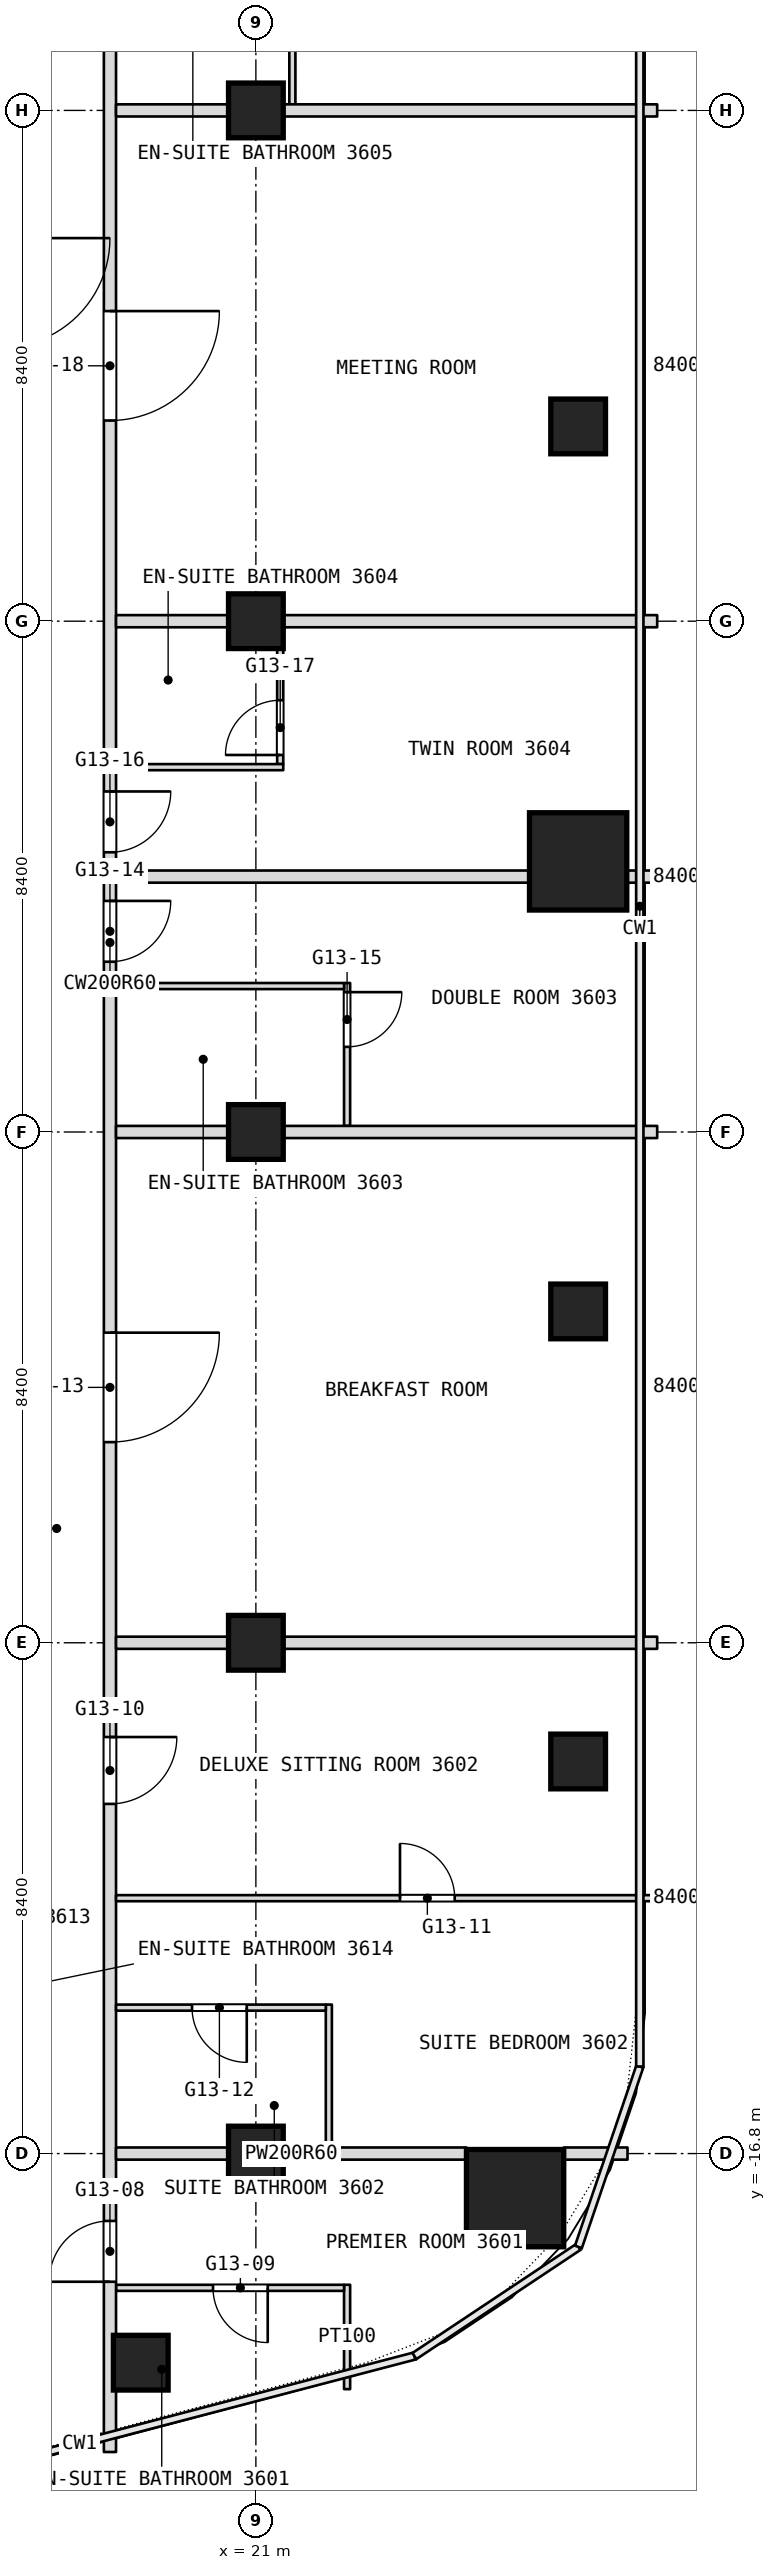
"""IFC4 building model, lengths in metres.
Left out: names, types, materials, properties, quantities, classifications, styles, units other than length and angle.
Written with IfcOpenShell. Run it as: python <this file> out.ifc"""

import sys

from ifc_helpers import new_model, si_unit, direction, frame, frame_2d, origin, origin_2d, place, context, subcontext, project, spatial, rectangle, extrude, element, fill, save


model = new_model("IFC4")
c1 = context("Model", 3, precision=1e-05, world=origin(), true_north=direction((0.0, 1.0)))
c2 = subcontext(c1, "Body", "Model", "MODEL_VIEW")
j1 = project(units=[si_unit("LENGTHUNIT", "METRE"), si_unit("PLANEANGLEUNIT", "RADIAN")], contexts=[c1])
p1 = place(None, origin())
s1 = spatial("IfcSite", under=j1, at=p1, CompositionType="ELEMENT")
p2 = place(p1, origin())
s2 = spatial("IfcBuilding", under=s1, at=p2, CompositionType="ELEMENT")
p3 = place(p2, frame((0.0, 0.0, 155.3)))
s3 = spatial("IfcBuildingStorey", under=s2, at=p3, CompositionType="ELEMENT", Elevation=155.3)
for number, where, z_axis, x_axis in (
    (1, (25.263, -17.533, 0.0), (0.0, 0.0, 1.0), (1.0, 0.0, 0.0)),
    (2, (26.3, 4.45, 0.0), (0.0, 0.0, 1.0), (1.0, 0.0, 0.0)),
):
    element("IfcColumn", number, at=place(p3, frame(where, z_axis=z_axis, x_axis=x_axis)), inside=s3, PredefinedType="COLUMN", context=c2, shape_type="SweptSolid", body=[
        extrude(rectangle(XDim=1.6, YDim=1.6, at=origin_2d()), origin(), (0.0, 0.0, 1.0), 3.6),
    ])
for number, where, z_axis, x_axis in (
    (3, (21.0, -16.8, 0.0), (0.0, 0.0, 1.0), (1.0, 0.0, 0.0)),
    (4, (21.0, -8.4, 0.0), (0.0, 0.0, 1.0), (1.0, 0.0, 0.0)),
    (5, (21.0, 0.0, 0.0), (0.0, 0.0, 1.0), (1.0, 0.0, 0.0)),
    (6, (21.0, 8.4, 0.0), (0.0, 0.0, 1.0), (1.0, 0.0, 0.0)),
    (7, (21.0, 16.8, 0.0), (0.0, 0.0, 1.0), (1.0, 0.0, 0.0)),
    (8, (26.3, 11.603, 0.0), (0.0, 0.0, 1.0), (1.0, 0.0, 0.0)),
    (9, (26.3, -2.951, 0.0), (0.0, 0.0, 1.0), (1.0, 0.0, 0.0)),
    (10, (26.3, -10.352, 0.0), (0.0, 0.0, 1.0), (1.0, 0.0, 0.0)),
    (11, (19.107, -20.239, 0.0), (0.0, 0.0, 1.0), (1.0, 0.0, 0.0)),
):
    element("IfcColumn", number, at=place(p3, frame(where, z_axis=z_axis, x_axis=x_axis)), inside=s3, PredefinedType="COLUMN", context=c2, shape_type="SweptSolid", body=[
        extrude(rectangle(XDim=0.9, YDim=0.9, at=origin_2d()), origin(), (0.0, 0.0, 1.0), 3.6),
    ])
p4 = place(p3, frame((22.5, -20.674, 0.0), z_axis=(0.0, 0.0, 1.0), x_axis=(0.0, 1.0, 0.0)))
e12 = element("IfcWall", 12, at=p4, inside=s3, PredefinedType="PARTITIONING", context=c2, shape_type="SweptSolid", body=[
    extrude(rectangle(XDim=1.716, YDim=0.1, at=frame_2d((0.858, 0.0))), origin(), (0.0, 0.0, 1.0), 3.34),
])
p5 = place(p3, frame((22.5, 0.1, 0.0), z_axis=(0.0, 0.0, 1.0), x_axis=(0.0, 1.0, 0.0)))
e13 = element("IfcWall", 13, at=p5, inside=s3, PredefinedType="PARTITIONING", context=c2, shape_type="SweptSolid", body=[
    extrude(rectangle(XDim=2.35, YDim=0.1, at=frame_2d((1.175, 0.0))), origin(), (0.0, 0.0, 1.0), 3.34),
])
p6 = place(p5, frame((1.3, 0.0, 0.0)))
e14 = element("IfcOpeningElement", 14, at=p6, cuts=e13, PredefinedType="OPENING", context=c2, shape_type="SweptSolid", body=[
    extrude(rectangle(XDim=0.9, YDim=2.1, at=frame_2d((0.45, 1.05))), frame((0.0, 0.05, 0.0), z_axis=(0.0, -1.0, 0.0), x_axis=(1.0, 0.0, 0.0)), (0.0, 0.0, 1.0), 0.1),
])
p7 = place(p3, frame((22.2, -16.7, 0.0), z_axis=(0.0, 0.0, 1.0), x_axis=(0.0, 1.0, 0.0)))
e15 = element("IfcWall", 15, at=p7, inside=s3, PredefinedType="PARTITIONING", context=c2, shape_type="SweptSolid", body=[
    extrude(rectangle(XDim=2.35, YDim=0.1, at=frame_2d((1.175, 0.0))), origin(), (0.0, 0.0, 1.0), 3.34),
])
p8 = place(p3, frame((21.6, 16.9, 0.0), z_axis=(0.0, 0.0, 1.0), x_axis=(0.0, 1.0, 0.0)))
e16 = element("IfcWall", 16, at=p8, inside=s3, PredefinedType="PARTITIONING", context=c2, shape_type="SweptSolid", body=[
    extrude(rectangle(XDim=3.55, YDim=0.1, at=frame_2d((1.775, 0.0))), origin(), (0.0, 0.0, 1.0), 3.34),
])
p9 = place(p8, frame((2.5, 0.0, 0.0)))
e17 = element("IfcOpeningElement", 17, at=p9, cuts=e16, PredefinedType="OPENING", context=c2, shape_type="SweptSolid", body=[
    extrude(rectangle(XDim=0.9, YDim=2.1, at=frame_2d((0.45, 1.05))), frame((0.0, 0.05, 0.0), z_axis=(0.0, -1.0, 0.0), x_axis=(1.0, 0.0, 0.0)), (0.0, 0.0, 1.0), 0.1),
])
p10 = place(p3, frame((21.4, 6.05, 0.0), z_axis=(0.0, 0.0, 1.0), x_axis=(0.0, 1.0, 0.0)))
e18 = element("IfcWall", 18, at=p10, inside=s3, PredefinedType="PARTITIONING", context=c2, shape_type="SweptSolid", body=[
    extrude(rectangle(XDim=2.45, YDim=0.1, at=frame_2d((1.225, 0.0))), origin(), (0.0, 0.0, 1.0), 3.34),
])
p11 = place(p10, frame((0.15, 0.0, 0.0)))
e19 = element("IfcOpeningElement", 19, at=p11, cuts=e18, PredefinedType="OPENING", context=c2, shape_type="SweptSolid", body=[
    extrude(rectangle(XDim=0.9, YDim=2.1, at=frame_2d((0.45, 1.05))), frame((0.0, 0.05, 0.0), z_axis=(0.0, -1.0, 0.0), x_axis=(1.0, 0.0, 0.0)), (0.0, 0.0, 1.0), 0.1),
])
p12 = place(p3, frame((18.7, -19.008, 0.0), z_axis=(0.0, 0.0, 1.0), x_axis=(1.0, 0.0, 0.0)))
e20 = element("IfcWall", 20, at=p12, inside=s3, PredefinedType="PARTITIONING", context=c2, shape_type="SweptSolid", body=[
    extrude(rectangle(XDim=3.75, YDim=0.1, at=frame_2d((1.875, 0.0))), origin(), (0.0, 0.0, 1.0), 3.34),
])
p13 = place(p12, frame((1.595, 0.0, 0.0)))
e21 = element("IfcOpeningElement", 21, at=p13, cuts=e20, PredefinedType="OPENING", context=c2, shape_type="SweptSolid", body=[
    extrude(rectangle(XDim=0.9, YDim=2.1, at=frame_2d((0.45, 1.05))), frame((0.0, 0.05, 0.0), z_axis=(0.0, -1.0, 0.0), x_axis=(1.0, 0.0, 0.0)), (0.0, 0.0, 1.0), 0.1),
])
p14 = place(p3, frame((18.6, -21.708, 0.0), z_axis=(0.0, 0.0, 1.0), x_axis=(0.0, 1.0, 0.0)))
e22 = element("IfcWall", 22, at=p14, inside=s3, PredefinedType="PARTITIONING", context=c2, shape_type="SweptSolid", body=[
    extrude(rectangle(XDim=49.648, YDim=0.2, at=frame_2d((24.824, 0.0))), origin(), (0.0, 0.0, 1.0), 3.34),
])
p15 = place(p14, frame((2.8, 0.0, 0.0)))
e23 = element("IfcOpeningElement", 23, at=p15, cuts=e22, PredefinedType="OPENING", context=c2, shape_type="SweptSolid", body=[
    extrude(rectangle(XDim=1.0, YDim=2.1, at=frame_2d((0.5, 1.05))), frame((0.0, 0.1, 0.0), z_axis=(0.0, -1.0, 0.0), x_axis=(1.0, 0.0, 0.0)), (0.0, 0.0, 1.0), 0.2),
])
p16 = place(p14, frame((10.658, 0.0, 0.0)))
e24 = element("IfcOpeningElement", 24, at=p16, cuts=e22, PredefinedType="OPENING", context=c2, shape_type="SweptSolid", body=[
    extrude(rectangle(XDim=1.1, YDim=2.1, at=frame_2d((0.55, 1.05))), frame((0.0, 0.1, 0.0), z_axis=(0.0, -1.0, 0.0), x_axis=(1.0, 0.0, 0.0)), (0.0, 0.0, 1.0), 0.2),
])
p17 = place(p14, frame((16.608, 0.0, 0.0)))
e25 = element("IfcOpeningElement", 25, at=p17, cuts=e22, PredefinedType="OPENING", context=c2, shape_type="SweptSolid", body=[
    extrude(rectangle(XDim=1.8, YDim=2.1, at=frame_2d((0.9, 1.05))), frame((0.0, 0.1, 0.0), z_axis=(0.0, -1.0, 0.0), x_axis=(1.0, 0.0, 0.0)), (0.0, 0.0, 1.0), 0.2),
])
p18 = place(p14, frame((24.508, 0.0, 0.0)))
e26 = element("IfcOpeningElement", 26, at=p18, cuts=e22, PredefinedType="OPENING", context=c2, shape_type="SweptSolid", body=[
    extrude(rectangle(XDim=1.0, YDim=2.1, at=frame_2d((0.5, 1.05))), frame((0.0, 0.1, 0.0), z_axis=(0.0, -1.0, 0.0), x_axis=(1.0, 0.0, 0.0)), (0.0, 0.0, 1.0), 0.2),
])
p19 = place(p14, frame((26.308, 0.0, 0.0)))
e27 = element("IfcOpeningElement", 27, at=p19, cuts=e22, PredefinedType="OPENING", context=c2, shape_type="SweptSolid", body=[
    extrude(rectangle(XDim=1.0, YDim=2.1, at=frame_2d((0.5, 1.05))), frame((0.0, 0.1, 0.0), z_axis=(0.0, -1.0, 0.0), x_axis=(1.0, 0.0, 0.0)), (0.0, 0.0, 1.0), 0.2),
])
p20 = place(p14, frame((33.408, 0.0, 0.0)))
e28 = element("IfcOpeningElement", 28, at=p20, cuts=e22, PredefinedType="OPENING", context=c2, shape_type="SweptSolid", body=[
    extrude(rectangle(XDim=1.8, YDim=2.1, at=frame_2d((0.9, 1.05))), frame((0.0, 0.1, 0.0), z_axis=(0.0, -1.0, 0.0), x_axis=(1.0, 0.0, 0.0)), (0.0, 0.0, 1.0), 0.2),
])
p21 = place(p14, frame((42.608, 0.0, 0.0)))
e29 = element("IfcOpeningElement", 29, at=p21, cuts=e22, PredefinedType="OPENING", context=c2, shape_type="SweptSolid", body=[
    extrude(rectangle(XDim=1.0, YDim=2.1, at=frame_2d((0.5, 1.05))), frame((0.0, 0.1, 0.0), z_axis=(0.0, -1.0, 0.0), x_axis=(1.0, 0.0, 0.0)), (0.0, 0.0, 1.0), 0.2),
])
p22 = place(p14, frame((44.608, 0.0, 0.0)))
e30 = element("IfcOpeningElement", 30, at=p22, cuts=e22, PredefinedType="OPENING", context=c2, shape_type="SweptSolid", body=[
    extrude(rectangle(XDim=1.0, YDim=2.1, at=frame_2d((0.5, 1.05))), frame((0.0, 0.1, 0.0), z_axis=(0.0, -1.0, 0.0), x_axis=(1.0, 0.0, 0.0)), (0.0, 0.0, 1.0), 0.2),
])
p23 = place(p3, frame((18.7, -16.8, 0.0), z_axis=(0.0, 0.0, 1.0), x_axis=(1.0, 0.0, 0.0)))
e31 = element("IfcWall", 31, at=p23, inside=s3, PredefinedType="PARTITIONING", context=c2, shape_type="SweptSolid", body=[
    extrude(rectangle(XDim=5.763, YDim=0.2, at=frame_2d((2.881, 0.0))), origin(), (0.0, 0.0, 1.0), 2.89),
])
p24 = place(p3, frame((26.063, -16.8, 0.0), z_axis=(0.0, 0.0, 1.0), x_axis=(1.0, 0.0, 0.0)))
e32 = element("IfcWall", 32, at=p24, inside=s3, PredefinedType="PARTITIONING", context=c2, shape_type="SweptSolid", body=[
    extrude(rectangle(XDim=1.049, YDim=0.2, at=frame_2d((0.524, 0.0))), origin(), (0.0, 0.0, 1.0), 3.34),
])
p25 = place(p3, frame((18.7, -14.4, 0.0), z_axis=(0.0, 0.0, 1.0), x_axis=(1.0, 0.0, 0.0)))
e33 = element("IfcWall", 33, at=p25, inside=s3, PredefinedType="PARTITIONING", context=c2, shape_type="SweptSolid", body=[
    extrude(rectangle(XDim=3.45, YDim=0.1, at=frame_2d((1.725, 0.0))), origin(), (0.0, 0.0, 1.0), 3.34),
])
p26 = place(p25, frame((1.25, 0.0, 0.0)))
e34 = element("IfcOpeningElement", 34, at=p26, cuts=e33, PredefinedType="OPENING", context=c2, shape_type="SweptSolid", body=[
    extrude(rectangle(XDim=0.9, YDim=2.1, at=frame_2d((0.45, 1.05))), frame((0.0, 0.05, 0.0), z_axis=(0.0, -1.0, 0.0), x_axis=(1.0, 0.0, 0.0)), (0.0, 0.0, 1.0), 0.1),
])
p27 = place(p3, frame((18.7, -12.6, 0.0), z_axis=(0.0, 0.0, 1.0), x_axis=(1.0, 0.0, 0.0)))
e35 = element("IfcWall", 35, at=p27, inside=s3, PredefinedType="PARTITIONING", context=c2, shape_type="SweptSolid", body=[
    extrude(rectangle(XDim=8.9, YDim=0.1, at=frame_2d((4.45, 0.0))), origin(), (0.0, 0.0, 1.0), 3.34),
])
p28 = place(p27, frame((4.67, 0.0, 0.0)))
e36 = element("IfcOpeningElement", 36, at=p28, cuts=e35, PredefinedType="OPENING", context=c2, shape_type="SweptSolid", body=[
    extrude(rectangle(XDim=0.9, YDim=2.1, at=frame_2d((0.45, 1.05))), frame((0.0, 0.05, 0.0), z_axis=(0.0, -1.0, 0.0), x_axis=(1.0, 0.0, 0.0)), (0.0, 0.0, 1.0), 0.1),
])
for number, where, z_axis, x_axis in (
    (37, (18.7, -8.4, 0.0), (0.0, 0.0, 1.0), (1.0, 0.0, 0.0)),
    (38, (18.7, 0.0, 0.0), (0.0, 0.0, 1.0), (1.0, 0.0, 0.0)),
):
    element("IfcWall", number, at=place(p3, frame(where, z_axis=z_axis, x_axis=x_axis)), inside=s3, PredefinedType="PARTITIONING", context=c2, shape_type="SweptSolid", body=[
        extrude(rectangle(XDim=8.9, YDim=0.2, at=frame_2d((4.45, 0.0))), origin(), (0.0, 0.0, 1.0), 2.89),
    ])
p29 = place(p3, frame((18.7, 2.4, 0.0), z_axis=(0.0, 0.0, 1.0), x_axis=(1.0, 0.0, 0.0)))
e39 = element("IfcWall", 39, at=p29, inside=s3, PredefinedType="PARTITIONING", context=c2, shape_type="SweptSolid", body=[
    extrude(rectangle(XDim=3.75, YDim=0.1, at=frame_2d((1.875, 0.0))), origin(), (0.0, 0.0, 1.0), 3.34),
])
p30 = place(p3, frame((18.7, 4.2, 0.0), z_axis=(0.0, 0.0, 1.0), x_axis=(1.0, 0.0, 0.0)))
e40 = element("IfcWall", 40, at=p30, inside=s3, PredefinedType="PARTITIONING", context=c2, shape_type="SweptSolid", body=[
    extrude(rectangle(XDim=6.8, YDim=0.2, at=frame_2d((3.4, 0.0))), origin(), (0.0, 0.0, 1.0), 3.34),
])
p31 = place(p3, frame((27.1, 4.2, 0.0), z_axis=(0.0, 0.0, 1.0), x_axis=(1.0, 0.0, 0.0)))
e41 = element("IfcWall", 41, at=p31, inside=s3, PredefinedType="PARTITIONING", context=c2, shape_type="SweptSolid", body=[
    extrude(rectangle(XDim=0.5, YDim=0.2, at=frame_2d((0.25, 0.0))), origin(), (0.0, 0.0, 1.0), 3.34),
])
p32 = place(p3, frame((18.7, 6.0, 0.0), z_axis=(0.0, 0.0, 1.0), x_axis=(1.0, 0.0, 0.0)))
e42 = element("IfcWall", 42, at=p32, inside=s3, PredefinedType="PARTITIONING", context=c2, shape_type="SweptSolid", body=[
    extrude(rectangle(XDim=2.75, YDim=0.1, at=frame_2d((1.375, 0.0))), origin(), (0.0, 0.0, 1.0), 3.34),
])
for number, where, z_axis, x_axis in (
    (43, (18.7, 8.4, 0.0), (0.0, 0.0, 1.0), (1.0, 0.0, 0.0)),
    (44, (18.7, 16.8, 0.0), (0.0, 0.0, 1.0), (1.0, 0.0, 0.0)),
):
    element("IfcWall", number, at=place(p3, frame(where, z_axis=z_axis, x_axis=x_axis)), inside=s3, PredefinedType="PARTITIONING", context=c2, shape_type="SweptSolid", body=[
        extrude(rectangle(XDim=8.9, YDim=0.2, at=frame_2d((4.45, 0.0))), origin(), (0.0, 0.0, 1.0), 2.89),
    ])
p33 = place(p6, origin())
e45 = element("IfcDoor", 45, at=p33, inside=s3, OperationType="SINGLE_SWING_RIGHT", PredefinedType="DOOR", context=c2, shape_type="SweptSolid", body=[
    extrude(rectangle(XDim=0.9, YDim=2.1, at=frame_2d((0.45, 1.05))), frame((0.0, 0.025, 0.0), z_axis=(0.0, -1.0, 0.0), x_axis=(1.0, 0.0, 0.0)), (0.0, 0.0, 1.0), 0.05),
])
fill(e14, e45)
p34 = place(p11, origin())
e46 = element("IfcDoor", 46, at=p34, inside=s3, OperationType="SINGLE_SWING_LEFT", PredefinedType="DOOR", context=c2, shape_type="SweptSolid", body=[
    extrude(rectangle(XDim=0.9, YDim=2.1, at=frame_2d((0.45, 1.05))), frame((0.0, 0.025, 0.0), z_axis=(0.0, -1.0, 0.0), x_axis=(1.0, 0.0, 0.0)), (0.0, 0.0, 1.0), 0.05),
])
fill(e19, e46)
p35 = place(p13, origin())
e47 = element("IfcDoor", 47, at=p35, inside=s3, OperationType="SINGLE_SWING_RIGHT", PredefinedType="DOOR", context=c2, shape_type="SweptSolid", body=[
    extrude(rectangle(XDim=0.9, YDim=2.1, at=frame_2d((0.45, 1.05))), frame((0.0, 0.025, 0.0), z_axis=(0.0, -1.0, 0.0), x_axis=(1.0, 0.0, 0.0)), (0.0, 0.0, 1.0), 0.05),
])
fill(e21, e47)
p36 = place(p15, origin())
e48 = element("IfcDoor", 48, at=p36, inside=s3, OperationType="SINGLE_SWING_RIGHT", PredefinedType="DOOR", context=c2, shape_type="SweptSolid", body=[
    extrude(rectangle(XDim=1.0, YDim=2.1, at=frame_2d((0.5, 1.05))), frame((0.0, 0.025, 0.0), z_axis=(0.0, -1.0, 0.0), x_axis=(1.0, 0.0, 0.0)), (0.0, 0.0, 1.0), 0.05),
])
fill(e23, e48)
p37 = place(p16, origin())
e49 = element("IfcDoor", 49, at=p37, inside=s3, OperationType="SINGLE_SWING_RIGHT", PredefinedType="DOOR", context=c2, shape_type="SweptSolid", body=[
    extrude(rectangle(XDim=1.1, YDim=2.1, at=frame_2d((0.55, 1.05))), frame((0.0, 0.025, 0.0), z_axis=(0.0, -1.0, 0.0), x_axis=(1.0, 0.0, 0.0)), (0.0, 0.0, 1.0), 0.05),
])
fill(e24, e49)
p38 = place(p17, origin())
e50 = element("IfcDoor", 50, at=p38, inside=s3, OperationType="DOUBLE_DOOR_SINGLE_SWING", PredefinedType="DOOR", context=c2, shape_type="SweptSolid", body=[
    extrude(rectangle(XDim=1.8, YDim=2.1, at=frame_2d((0.9, 1.05))), frame((0.0, 0.025, 0.0), z_axis=(0.0, -1.0, 0.0), x_axis=(1.0, 0.0, 0.0)), (0.0, 0.0, 1.0), 0.05),
])
fill(e25, e50)
p39 = place(p18, origin())
e51 = element("IfcDoor", 51, at=p39, inside=s3, OperationType="SINGLE_SWING_RIGHT", PredefinedType="DOOR", context=c2, shape_type="SweptSolid", body=[
    extrude(rectangle(XDim=1.0, YDim=2.1, at=frame_2d((0.5, 1.05))), frame((0.0, 0.025, 0.0), z_axis=(0.0, -1.0, 0.0), x_axis=(1.0, 0.0, 0.0)), (0.0, 0.0, 1.0), 0.05),
])
fill(e26, e51)
p40 = place(p19, origin())
e52 = element("IfcDoor", 52, at=p40, inside=s3, OperationType="SINGLE_SWING_RIGHT", PredefinedType="DOOR", context=c2, shape_type="SweptSolid", body=[
    extrude(rectangle(XDim=1.0, YDim=2.1, at=frame_2d((0.5, 1.05))), frame((0.0, 0.025, 0.0), z_axis=(0.0, -1.0, 0.0), x_axis=(1.0, 0.0, 0.0)), (0.0, 0.0, 1.0), 0.05),
])
fill(e27, e52)
p41 = place(p20, origin())
e53 = element("IfcDoor", 53, at=p41, inside=s3, OperationType="DOUBLE_DOOR_SINGLE_SWING", PredefinedType="DOOR", context=c2, shape_type="SweptSolid", body=[
    extrude(rectangle(XDim=1.8, YDim=2.1, at=frame_2d((0.9, 1.05))), frame((0.0, 0.025, 0.0), z_axis=(0.0, -1.0, 0.0), x_axis=(1.0, 0.0, 0.0)), (0.0, 0.0, 1.0), 0.05),
])
fill(e28, e53)
p42 = place(p26, origin())
e54 = element("IfcDoor", 54, at=p42, inside=s3, OperationType="SINGLE_SWING_RIGHT", PredefinedType="DOOR", context=c2, shape_type="SweptSolid", body=[
    extrude(rectangle(XDim=0.9, YDim=2.1, at=frame_2d((0.45, 1.05))), frame((0.0, 0.025, 0.0), z_axis=(0.0, -1.0, 0.0), x_axis=(1.0, 0.0, 0.0)), (0.0, 0.0, 1.0), 0.05),
])
fill(e34, e54)
p43 = place(p28, origin())
e55 = element("IfcDoor", 55, at=p43, inside=s3, OperationType="SINGLE_SWING_RIGHT", PredefinedType="DOOR", context=c2, shape_type="SweptSolid", body=[
    extrude(rectangle(XDim=0.9, YDim=2.1, at=frame_2d((0.45, 1.05))), frame((0.0, 0.025, 0.0), z_axis=(0.0, -1.0, 0.0), x_axis=(1.0, 0.0, 0.0)), (0.0, 0.0, 1.0), 0.05),
])
fill(e36, e55)
save(model, sys.argv[1])
